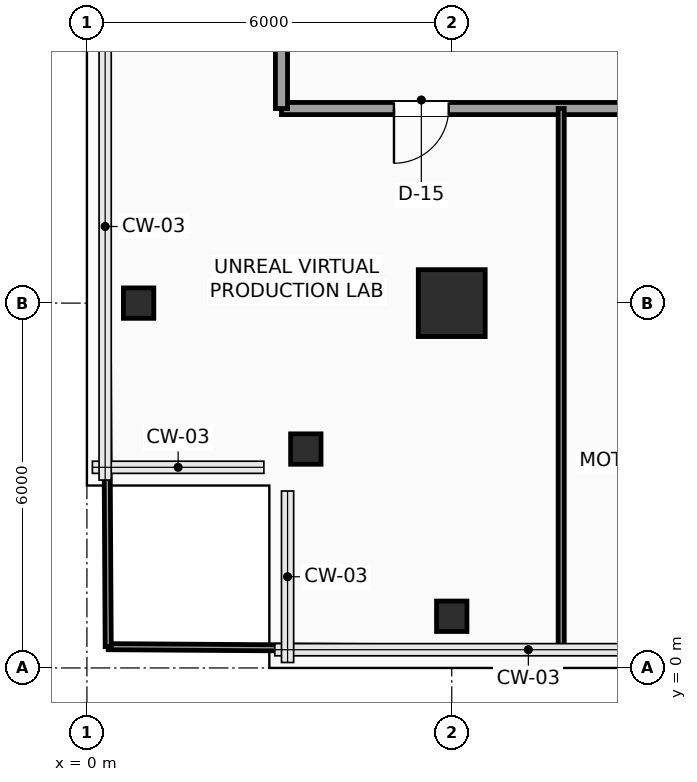
"""IFC4 building model, lengths in metres.
Left out: names, types, materials, properties, quantities, classifications, styles, units other than length and angle.
Written with IfcOpenShell. Run it as: python <this file> out.ifc"""

import sys

from ifc_helpers import new_model, si_unit, direction, frame, frame_2d, origin, origin_2d, place, context, subcontext, project, spatial, rectangle, hollow_rectangle, extrude, element, fill, save


model = new_model("IFC4")
c1 = context("Model", 3, precision=1e-05, world=origin(), true_north=direction((0.0, 1.0)))
c2 = subcontext(c1, "Body", "Model", "MODEL_VIEW")
j1 = project(units=[si_unit("LENGTHUNIT", "METRE"), si_unit("PLANEANGLEUNIT", "RADIAN")], contexts=[c1])
p1 = place(None, origin())
s1 = spatial("IfcSite", under=j1, at=p1, CompositionType="ELEMENT")
p2 = place(p1, origin())
s2 = spatial("IfcBuilding", under=s1, at=p2, CompositionType="ELEMENT")
p3 = place(p2, frame((0.0, 0.0, 145.65)))
s3 = spatial("IfcBuildingStorey", under=s2, at=p3, CompositionType="ELEMENT", Elevation=145.65)
for number, where, z_axis, x_axis in (
    (1, (3.6, 3.6, 0.0), (0.0, 0.0, 1.0), (1.0, 0.0, 0.0)),
    (2, (0.85, 6.0, 0.0), (0.0, 0.0, 1.0), (1.0, 0.0, 0.0)),
    (3, (6.0, 0.85, 0.0), (0.0, 0.0, 1.0), (1.0, 0.0, 0.0)),
):
    element("IfcColumn", number, at=place(p3, frame(where, z_axis=z_axis, x_axis=x_axis)), inside=s3, PredefinedType="COLUMN", context=c2, shape_type="SweptSolid", body=[
        extrude(hollow_rectangle(XDim=0.5, YDim=0.5, WallThickness=0.025, InnerFilletRadius=0.025, OuterFilletRadius=0.04, at=origin_2d()), origin(), (0.0, 0.0, 1.0), 3.75),
    ])
p4 = place(p3, frame((6.0, 6.0, 0.0), z_axis=(0.0, 0.0, 1.0), x_axis=(1.0, 0.0, 0.0)))
e4 = element("IfcColumn", 4, at=p4, inside=s3, PredefinedType="COLUMN", context=c2, shape_type="SweptSolid", body=[
    extrude(rectangle(XDim=1.1, YDim=1.1, at=origin_2d()), origin(), (0.0, 0.0, 1.0), 3.75),
])
p5 = place(p3, frame((21.35, 9.2, 0.0), z_axis=(0.0, 0.0, 1.0), x_axis=(-1.0, 0.0, 0.0)))
e5 = element("IfcWall", 5, at=p5, inside=s3, PredefinedType="PARTITIONING", context=c2, shape_type="SweptSolid", body=[
    extrude(rectangle(XDim=18.15, YDim=0.2, at=frame_2d((9.075, 0.0))), origin(), (0.0, 0.0, 1.0), 3.067),
])
p6 = place(p5, frame((15.4, 0.0, 0.0)))
e6 = element("IfcOpeningElement", 6, at=p6, cuts=e5, PredefinedType="OPENING", context=c2, shape_type="SweptSolid", body=[
    extrude(rectangle(XDim=0.9, YDim=2.1, at=frame_2d((0.45, 1.05))), frame((0.0, 0.11, 0.0), z_axis=(0.0, -1.0, 0.0), x_axis=(1.0, 0.0, 0.0)), (0.0, 0.0, 1.0), 0.22),
])
p7 = place(p5, frame((9.1, 0.0, 0.0)))
e7 = element("IfcOpeningElement", 7, at=p7, cuts=e5, PredefinedType="OPENING", context=c2, shape_type="SweptSolid", body=[
    extrude(rectangle(XDim=0.9, YDim=2.1, at=frame_2d((0.45, 1.05))), frame((0.0, 0.11, 0.0), z_axis=(0.0, -1.0, 0.0), x_axis=(1.0, 0.0, 0.0)), (0.0, 0.0, 1.0), 0.22),
])
p8 = place(p5, frame((2.325, 0.0, 0.0)))
e8 = element("IfcOpeningElement", 8, at=p8, cuts=e5, PredefinedType="OPENING", context=c2, shape_type="SweptSolid", body=[
    extrude(rectangle(XDim=0.9, YDim=2.1, at=frame_2d((0.45, 1.05))), frame((0.0, 0.11, 0.0), z_axis=(0.0, -1.0, 0.0), x_axis=(1.0, 0.0, 0.0)), (0.0, 0.0, 1.0), 0.22),
])
p9 = place(p3, frame((3.2, 9.2, 0.0), z_axis=(0.0, 0.0, 1.0), x_axis=(0.0, 1.0, 0.0)))
e9 = element("IfcWall", 9, at=p9, inside=s3, PredefinedType="PARTITIONING", context=c2, shape_type="SweptSolid", body=[
    extrude(rectangle(XDim=2.05, YDim=0.2, at=frame_2d((1.025, 0.0))), origin(), (0.0, 0.0, 1.0), 3.525),
])
p10 = place(p3, frame((0.35, 0.35, 0.0), z_axis=(0.0, 0.0, 1.0), x_axis=(0.999977434951, -0.006717855945, 0.0)))
e10 = element("IfcWall", 10, at=p10, inside=s3, PredefinedType="PARTITIONING", context=c2, shape_type="SweptSolid", body=[
    extrude(rectangle(XDim=7.45, YDim=0.1, at=frame_2d((3.725, 0.0))), origin(), (0.0, 0.0, 1.0), 3.525),
])
p11 = place(p3, frame((0.35, 0.35, 0.0), z_axis=(0.0, 0.0, 1.0), x_axis=(-0.005655237989, 0.999984009014, 0.0)))
e11 = element("IfcWall", 11, at=p11, inside=s3, PredefinedType="PARTITIONING", context=c2, shape_type="SweptSolid", body=[
    extrude(rectangle(XDim=8.85, YDim=0.1, at=frame_2d((4.425, 0.0))), origin(), (0.0, 0.0, 1.0), 3.525),
])
p12 = place(p3, frame((7.8, 0.3, 0.0), z_axis=(0.0, 0.0, 1.0), x_axis=(0.0, 1.0, 0.0)))
e12 = element("IfcWall", 12, at=p12, inside=s3, PredefinedType="PARTITIONING", context=c2, shape_type="SweptSolid", body=[
    extrude(rectangle(XDim=8.9, YDim=0.1, at=frame_2d((4.45, 0.0))), origin(), (0.0, 0.0, 1.0), 3.525),
])
p13 = place(p6, origin())
e13 = element("IfcDoor", 13, at=p13, inside=s3, OperationType="SINGLE_SWING_RIGHT", PredefinedType="DOOR", context=c2, shape_type="SweptSolid", body=[
    extrude(rectangle(XDim=0.9, YDim=2.1, at=frame_2d((0.45, 1.05))), frame((0.0, 0.025, 0.0), z_axis=(0.0, -1.0, 0.0), x_axis=(1.0, 0.0, 0.0)), (0.0, 0.0, 1.0), 0.05),
])
fill(e6, e13)
save(model, sys.argv[1])
